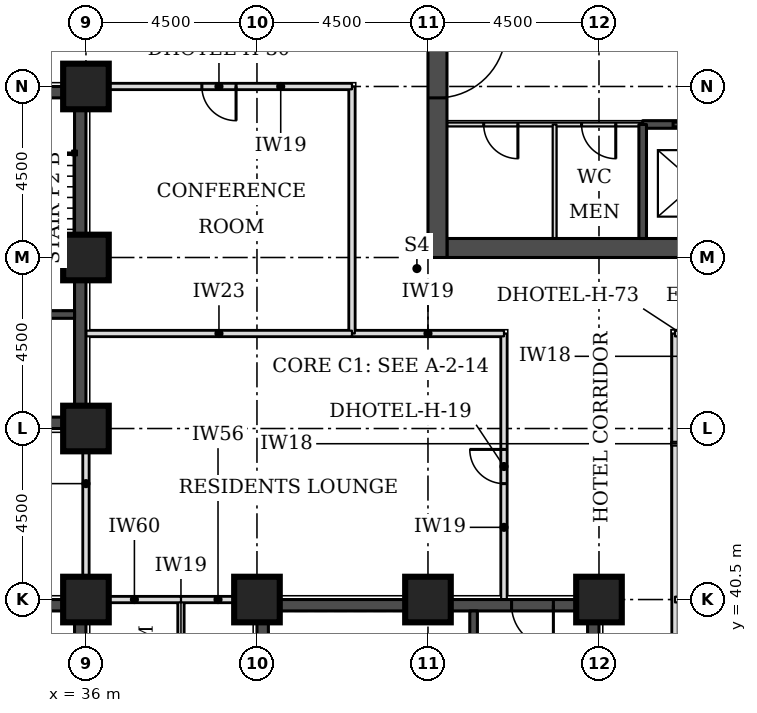
"""IFC4 building model, lengths in metres.
Left out: names, types, materials, properties, quantities, classifications, styles, units other than length and angle.
Written with IfcOpenShell. Run it as: python <this file> out.ifc"""

import sys

from ifc_helpers import new_model, si_unit, direction, frame, frame_2d, origin, origin_2d, place, context, subcontext, project, spatial, rectangle, extrude, element, fill, save


model = new_model("IFC4")
c1 = context("Model", 3, precision=1e-05, world=origin(), true_north=direction((0.0, 1.0)))
c2 = subcontext(c1, "Body", "Model", "MODEL_VIEW")
j1 = project(units=[si_unit("LENGTHUNIT", "METRE"), si_unit("PLANEANGLEUNIT", "RADIAN")], contexts=[c1])
p1 = place(None, origin())
s1 = spatial("IfcSite", under=j1, at=p1, CompositionType="ELEMENT")
p2 = place(p1, origin())
s2 = spatial("IfcBuilding", under=s1, at=p2, CompositionType="ELEMENT")
p3 = place(p2, frame((0.0, 0.0, 46.2)))
s3 = spatial("IfcBuildingStorey", under=s2, at=p3, CompositionType="ELEMENT", Elevation=46.2)
for number, where, z_axis, x_axis in (
    (1, (36.0, 40.5, 0.0), (0.0, 0.0, 1.0), (1.0, 0.0, 0.0)),
    (2, (40.5, 40.5, 0.0), (0.0, 0.0, 1.0), (1.0, 0.0, 0.0)),
    (3, (45.0, 40.5, 0.0), (0.0, 0.0, 1.0), (1.0, 0.0, 0.0)),
    (4, (49.5, 40.5, 0.0), (0.0, 0.0, 1.0), (1.0, 0.0, 0.0)),
    (5, (36.0, 45.0, 0.0), (0.0, 0.0, 1.0), (1.0, 0.0, 0.0)),
    (6, (36.0, 49.5, 0.0), (0.0, 0.0, 1.0), (1.0, 0.0, 0.0)),
    (7, (36.0, 54.0, 0.0), (0.0, 0.0, 1.0), (1.0, 0.0, 0.0)),
):
    element("IfcColumn", number, at=place(p3, frame(where, z_axis=z_axis, x_axis=x_axis)), inside=s3, PredefinedType="COLUMN", context=c2, shape_type="SweptSolid", body=[
        extrude(rectangle(XDim=1.2, YDim=1.2, at=origin_2d()), origin(), (0.0, 0.0, 1.0), 3.3),
    ])
p4 = place(p3, frame((45.5, 49.75, 0.0), z_axis=(0.0, 0.0, 1.0), x_axis=(1.0, 0.0, 0.0)))
e8 = element("IfcWall", 8, at=p4, inside=s3, PredefinedType="SHEAR", context=c2, shape_type="SweptSolid", body=[
    extrude(rectangle(XDim=21.5, YDim=0.5, at=frame_2d((10.75, 0.0))), origin(), (0.0, 0.0, 1.0), 3.3),
])
p5 = place(p3, frame((45.25, 49.5, 0.0), z_axis=(0.0, 0.0, 1.0), x_axis=(0.0, 1.0, 0.0)))
e9 = element("IfcWall", 9, at=p5, inside=s3, PredefinedType="SHEAR", context=c2, shape_type="SweptSolid", body=[
    extrude(rectangle(XDim=22.5, YDim=0.5, at=frame_2d((11.25, 0.0))), origin(), (0.0, 0.0, 1.0), 3.3),
])
p6 = place(p5, frame((4.2, 0.0, 0.0)))
e10 = element("IfcOpeningElement", 10, at=p6, cuts=e9, PredefinedType="OPENING", context=c2, shape_type="SweptSolid", body=[
    extrude(rectangle(XDim=1.8, YDim=2.1, at=frame_2d((0.9, 1.05))), frame((0.0, 0.26, 0.0), z_axis=(0.0, -1.0, 0.0), x_axis=(1.0, 0.0, 0.0)), (0.0, 0.0, 1.0), 0.52),
])
p7 = place(p5, frame((6.9, 0.0, 0.0)))
e11 = element("IfcOpeningElement", 11, at=p7, cuts=e9, PredefinedType="OPENING", context=c2, shape_type="SweptSolid", body=[
    extrude(rectangle(XDim=1.1, YDim=2.1, at=frame_2d((0.55, 1.05))), frame((0.0, 0.26, 0.0), z_axis=(0.0, -1.0, 0.0), x_axis=(1.0, 0.0, 0.0)), (0.0, 0.0, 1.0), 0.52),
])
p8 = place(p5, frame((13.6, 0.0, 0.0)))
e12 = element("IfcOpeningElement", 12, at=p8, cuts=e9, PredefinedType="OPENING", context=c2, shape_type="SweptSolid", body=[
    extrude(rectangle(XDim=1.1, YDim=2.1, at=frame_2d((0.55, 1.05))), frame((0.0, 0.26, 0.0), z_axis=(0.0, -1.0, 0.0), x_axis=(1.0, 0.0, 0.0)), (0.0, 0.0, 1.0), 0.52),
])
p9 = place(p5, frame((16.5, 0.0, 0.0)))
e13 = element("IfcOpeningElement", 13, at=p9, cuts=e9, PredefinedType="OPENING", context=c2, shape_type="SweptSolid", body=[
    extrude(rectangle(XDim=1.8, YDim=2.1, at=frame_2d((0.9, 1.05))), frame((0.0, 0.26, 0.0), z_axis=(0.0, -1.0, 0.0), x_axis=(1.0, 0.0, 0.0)), (0.0, 0.0, 1.0), 0.52),
])
p10 = place(p3, frame((27.3, 45.15, 0.0), z_axis=(0.0, 0.0, 1.0), x_axis=(1.0, 0.0, 0.0)))
e14 = element("IfcWall", 14, at=p10, inside=s3, PredefinedType="SHEAR", context=c2, shape_type="SweptSolid", body=[
    extrude(rectangle(XDim=8.4, YDim=0.3, at=frame_2d((4.2, 0.0))), origin(), (0.0, 0.0, 1.0), 3.3),
])
p11 = place(p10, frame((5.2, 0.0, 0.0)))
e15 = element("IfcOpeningElement", 15, at=p11, cuts=e14, PredefinedType="OPENING", context=c2, shape_type="SweptSolid", body=[
    extrude(rectangle(XDim=1.0, YDim=2.1, at=frame_2d((0.5, 1.05))), frame((0.0, 0.16, 0.0), z_axis=(0.0, -1.0, 0.0), x_axis=(1.0, 0.0, 0.0)), (0.0, 0.0, 1.0), 0.32),
])
p12 = place(p3, frame((27.3, 53.85, 0.0), z_axis=(0.0, 0.0, 1.0), x_axis=(1.0, 0.0, 0.0)))
e16 = element("IfcWall", 16, at=p12, inside=s3, PredefinedType="SHEAR", context=c2, shape_type="SweptSolid", body=[
    extrude(rectangle(XDim=8.4, YDim=0.3, at=frame_2d((4.2, 0.0))), origin(), (0.0, 0.0, 1.0), 3.3),
])
p13 = place(p12, frame((6.4, 0.0, 0.0)))
e17 = element("IfcOpeningElement", 17, at=p13, cuts=e16, PredefinedType="OPENING", context=c2, shape_type="SweptSolid", body=[
    extrude(rectangle(XDim=1.1, YDim=2.1, at=frame_2d((0.55, 1.05))), frame((0.0, 0.16, 0.0), z_axis=(0.0, -1.0, 0.0), x_axis=(1.0, 0.0, 0.0)), (0.0, 0.0, 1.0), 0.32),
])
p14 = place(p3, frame((35.85, 45.0, 0.0), z_axis=(0.0, 0.0, 1.0), x_axis=(0.0, 1.0, 0.0)))
e18 = element("IfcWall", 18, at=p14, inside=s3, PredefinedType="SHEAR", context=c2, shape_type="SweptSolid", body=[
    extrude(rectangle(XDim=9.0, YDim=0.3, at=frame_2d((4.5, 0.0))), origin(), (0.0, 0.0, 1.0), 3.3),
])
p15 = place(p3, frame((40.8, 40.35, 0.0), z_axis=(0.0, 0.0, 1.0), x_axis=(1.0, 0.0, 0.0)))
e19 = element("IfcWall", 19, at=p15, inside=s3, PredefinedType="SHEAR", context=c2, shape_type="SweptSolid", body=[
    extrude(rectangle(XDim=8.4, YDim=0.3, at=frame_2d((4.2, 0.0))), origin(), (0.0, 0.0, 1.0), 3.3),
])
p16 = place(p15, frame((6.4, 0.0, 0.0)))
e20 = element("IfcOpeningElement", 20, at=p16, cuts=e19, PredefinedType="OPENING", context=c2, shape_type="SweptSolid", body=[
    extrude(rectangle(XDim=1.1, YDim=2.1, at=frame_2d((0.55, 1.05))), frame((0.0, 0.16, 0.0), z_axis=(0.0, -1.0, 0.0), x_axis=(1.0, 0.0, 0.0)), (0.0, 0.0, 1.0), 0.32),
])
p17 = place(p3, frame((40.65, 31.5, 0.0), z_axis=(0.0, 0.0, 1.0), x_axis=(0.0, 1.0, 0.0)))
e21 = element("IfcWall", 21, at=p17, inside=s3, PredefinedType="SHEAR", context=c2, shape_type="SweptSolid", body=[
    extrude(rectangle(XDim=9.0, YDim=0.3, at=frame_2d((4.5, 0.0))), origin(), (0.0, 0.0, 1.0), 3.3),
])
p18 = place(p17, frame((0.4, 0.0, 0.0)))
e22 = element("IfcOpeningElement", 22, at=p18, cuts=e21, PredefinedType="OPENING", context=c2, shape_type="SweptSolid", body=[
    extrude(rectangle(XDim=1.1, YDim=2.1, at=frame_2d((0.55, 1.05))), frame((0.0, 0.16, 0.0), z_axis=(0.0, -1.0, 0.0), x_axis=(1.0, 0.0, 0.0)), (0.0, 0.0, 1.0), 0.32),
])
p19 = place(p3, frame((49.35, 31.5, 0.0), z_axis=(0.0, 0.0, 1.0), x_axis=(0.0, 1.0, 0.0)))
e23 = element("IfcWall", 23, at=p19, inside=s3, PredefinedType="SHEAR", context=c2, shape_type="SweptSolid", body=[
    extrude(rectangle(XDim=9.0, YDim=0.3, at=frame_2d((4.5, 0.0))), origin(), (0.0, 0.0, 1.0), 3.3),
])
p20 = place(p3, frame((27.3, 40.35, 0.0), z_axis=(0.0, 0.0, 1.0), x_axis=(1.0, 0.0, 0.0)))
e24 = element("IfcWall", 24, at=p20, inside=s3, PredefinedType="SHEAR", context=c2, shape_type="SweptSolid", body=[
    extrude(rectangle(XDim=8.4, YDim=0.3, at=frame_2d((4.2, 0.0))), origin(), (0.0, 0.0, 1.0), 3.3),
])
p21 = place(p20, frame((6.4, 0.0, 0.0)))
e25 = element("IfcOpeningElement", 25, at=p21, cuts=e24, PredefinedType="OPENING", context=c2, shape_type="SweptSolid", body=[
    extrude(rectangle(XDim=1.1, YDim=2.1, at=frame_2d((0.55, 1.05))), frame((0.0, 0.16, 0.0), z_axis=(0.0, -1.0, 0.0), x_axis=(1.0, 0.0, 0.0)), (0.0, 0.0, 1.0), 0.32),
])
p22 = place(p3, frame((35.85, 31.5, 0.0), z_axis=(0.0, 0.0, 1.0), x_axis=(0.0, 1.0, 0.0)))
e26 = element("IfcWall", 26, at=p22, inside=s3, PredefinedType="SHEAR", context=c2, shape_type="SweptSolid", body=[
    extrude(rectangle(XDim=9.0, YDim=0.3, at=frame_2d((4.5, 0.0))), origin(), (0.0, 0.0, 1.0), 3.3),
])
p23 = place(p3, frame((51.5, 25.15, 0.0), z_axis=(0.0, 0.0, 1.0), x_axis=(0.0, 1.0, 0.0)))
e27 = element("IfcWall", 27, at=p23, inside=s3, PredefinedType="PARTITIONING", context=c2, shape_type="SweptSolid", body=[
    extrude(rectangle(XDim=22.35, YDim=0.15, at=frame_2d((11.175, 0.0))), origin(), (0.0, 0.0, 1.0), 3.08),
])
p24 = place(p23, frame((0.347, 0.0, 0.0)))
e28 = element("IfcOpeningElement", 28, at=p24, cuts=e27, PredefinedType="OPENING", context=c2, shape_type="SweptSolid", body=[
    extrude(rectangle(XDim=1.0, YDim=2.1, at=frame_2d((0.5, 1.05))), frame((0.0, 0.085, 0.0), z_axis=(0.0, -1.0, 0.0), x_axis=(1.0, 0.0, 0.0)), (0.0, 0.0, 1.0), 0.17),
])
p25 = place(p23, frame((7.325, 0.0, 0.0)))
e29 = element("IfcOpeningElement", 29, at=p25, cuts=e27, PredefinedType="OPENING", context=c2, shape_type="SweptSolid", body=[
    extrude(rectangle(XDim=1.0, YDim=2.1, at=frame_2d((0.5, 1.05))), frame((0.0, 0.085, 0.0), z_axis=(0.0, -1.0, 0.0), x_axis=(1.0, 0.0, 0.0)), (0.0, 0.0, 1.0), 0.17),
])
p26 = place(p23, frame((11.675, 0.0, 0.0)))
e30 = element("IfcOpeningElement", 30, at=p26, cuts=e27, PredefinedType="OPENING", context=c2, shape_type="SweptSolid", body=[
    extrude(rectangle(XDim=1.0, YDim=2.1, at=frame_2d((0.5, 1.05))), frame((0.0, 0.085, 0.0), z_axis=(0.0, -1.0, 0.0), x_axis=(1.0, 0.0, 0.0)), (0.0, 0.0, 1.0), 0.17),
])
p27 = place(p3, frame((38.5, 27.15, 0.0), z_axis=(0.0, 0.0, 1.0), x_axis=(0.0, 1.0, 0.0)))
e31 = element("IfcWall", 31, at=p27, inside=s3, PredefinedType="PARTITIONING", context=c2, shape_type="SweptSolid", body=[
    extrude(rectangle(XDim=13.35, YDim=0.15, at=frame_2d((6.675, 0.0))), origin(), (0.0, 0.0, 1.0), 3.08),
])
p28 = place(p27, frame((6.225, 0.0, 0.0)))
e32 = element("IfcOpeningElement", 32, at=p28, cuts=e31, PredefinedType="OPENING", context=c2, shape_type="SweptSolid", body=[
    extrude(rectangle(XDim=0.9, YDim=2.1, at=frame_2d((0.45, 1.05))), frame((0.0, 0.085, 0.0), z_axis=(0.0, -1.0, 0.0), x_axis=(1.0, 0.0, 0.0)), (0.0, 0.0, 1.0), 0.17),
])
p29 = place(p3, frame((38.5, 40.5, 0.0), z_axis=(0.0, 0.0, 1.0), x_axis=(1.0, 0.0, 0.0)))
e33 = element("IfcWall", 33, at=p29, inside=s3, PredefinedType="PARTITIONING", context=c2, shape_type="SweptSolid", body=[
    extrude(rectangle(XDim=1.95, YDim=0.15, at=frame_2d((0.975, 0.0))), origin(), (0.0, 0.0, 1.0), 2.33),
])
p30 = place(p3, frame((36.0, 40.55, 0.0), z_axis=(0.0, 0.0, 1.0), x_axis=(0.0, 1.0, 0.0)))
e34 = element("IfcWall", 34, at=p30, inside=s3, PredefinedType="PARTITIONING", context=c2, shape_type="SweptSolid", body=[
    extrude(rectangle(XDim=4.4, YDim=0.15, at=frame_2d((2.2, 0.0))), origin(), (0.0, 0.0, 1.0), 2.33),
])
p31 = place(p3, frame((47.0, 40.5, 0.0), z_axis=(0.0, 0.0, 1.0), x_axis=(0.0, 1.0, 0.0)))
e35 = element("IfcWall", 35, at=p31, inside=s3, PredefinedType="PARTITIONING", context=c2, shape_type="SweptSolid", body=[
    extrude(rectangle(XDim=7.0, YDim=0.15, at=frame_2d((3.5, 0.0))), origin(), (0.0, 0.0, 1.0), 3.08),
])
p32 = place(p31, frame((3.05, 0.0, 0.0)))
e36 = element("IfcOpeningElement", 36, at=p32, cuts=e35, PredefinedType="OPENING", context=c2, shape_type="SweptSolid", body=[
    extrude(rectangle(XDim=0.9, YDim=2.1, at=frame_2d((0.45, 1.05))), frame((0.0, 0.085, 0.0), z_axis=(0.0, -1.0, 0.0), x_axis=(1.0, 0.0, 0.0)), (0.0, 0.0, 1.0), 0.17),
])
p33 = place(p3, frame((43.0, 47.5, 0.0), z_axis=(0.0, 0.0, 1.0), x_axis=(1.0, 0.0, 0.0)))
e37 = element("IfcWall", 37, at=p33, inside=s3, PredefinedType="PARTITIONING", context=c2, shape_type="SweptSolid", body=[
    extrude(rectangle(XDim=4.0, YDim=0.15, at=frame_2d((2.0, 0.0))), origin(), (0.0, 0.0, 1.0), 3.08),
])
p34 = place(p3, frame((43.0, 47.5, 0.0), z_axis=(0.0, 0.0, 1.0), x_axis=(0.0, 1.0, 0.0)))
e38 = element("IfcWall", 38, at=p34, inside=s3, PredefinedType="PARTITIONING", context=c2, shape_type="SweptSolid", body=[
    extrude(rectangle(XDim=6.5, YDim=0.15, at=frame_2d((3.25, 0.0))), origin(), (0.0, 0.0, 1.0), 3.08),
])
p35 = place(p3, frame((51.5, 47.5, 0.0), z_axis=(0.0, 0.0, 1.0), x_axis=(1.0, 0.0, 0.0)))
e39 = element("IfcWall", 39, at=p35, inside=s3, PredefinedType="PARTITIONING", context=c2, shape_type="SweptSolid", body=[
    extrude(rectangle(XDim=18.0, YDim=0.15, at=frame_2d((9.0, 0.0))), origin(), (0.0, 0.0, 1.0), 3.08),
])
p36 = place(p35, frame((12.65, 0.0, 0.0)))
e40 = element("IfcOpeningElement", 40, at=p36, cuts=e39, PredefinedType="OPENING", context=c2, shape_type="SweptSolid", body=[
    extrude(rectangle(XDim=1.1, YDim=2.1, at=frame_2d((0.55, 1.05))), frame((0.0, 0.085, 0.0), z_axis=(0.0, -1.0, 0.0), x_axis=(1.0, 0.0, 0.0)), (0.0, 0.0, 1.0), 0.17),
])
p37 = place(p35, frame((16.5, 0.0, 0.0)))
e41 = element("IfcOpeningElement", 41, at=p37, cuts=e39, PredefinedType="OPENING", context=c2, shape_type="SweptSolid", body=[
    extrude(rectangle(XDim=1.0, YDim=2.1, at=frame_2d((0.5, 1.05))), frame((0.0, 0.085, 0.0), z_axis=(0.0, -1.0, 0.0), x_axis=(1.0, 0.0, 0.0)), (0.0, 0.0, 1.0), 0.17),
])
p38 = place(p35, frame((4.21, 0.0, 0.0)))
e42 = element("IfcOpeningElement", 42, at=p38, cuts=e39, PredefinedType="OPENING", context=c2, shape_type="SweptSolid", body=[
    extrude(rectangle(XDim=1.0, YDim=2.1, at=frame_2d((0.5, 1.05))), frame((0.0, 0.085, 0.0), z_axis=(0.0, -1.0, 0.0), x_axis=(1.0, 0.0, 0.0)), (0.0, 0.0, 1.0), 0.17),
])
p39 = place(p3, frame((36.05, 54.0, 0.0), z_axis=(0.0, 0.0, 1.0), x_axis=(1.0, 0.0, 0.0)))
e43 = element("IfcWall", 43, at=p39, inside=s3, PredefinedType="PARTITIONING", context=c2, shape_type="SweptSolid", body=[
    extrude(rectangle(XDim=6.95, YDim=0.15, at=frame_2d((3.475, 0.0))), origin(), (0.0, 0.0, 1.0), 3.08),
])
p40 = place(p39, frame((3.0, 0.0, 0.0)))
e44 = element("IfcOpeningElement", 44, at=p40, cuts=e43, PredefinedType="OPENING", context=c2, shape_type="SweptSolid", body=[
    extrude(rectangle(XDim=0.9, YDim=2.1, at=frame_2d((0.45, 1.05))), frame((0.0, 0.085, 0.0), z_axis=(0.0, -1.0, 0.0), x_axis=(1.0, 0.0, 0.0)), (0.0, 0.0, 1.0), 0.17),
])
p41 = place(p3, frame((36.05, 40.5, 0.0), z_axis=(0.0, 0.0, 1.0), x_axis=(1.0, 0.0, 0.0)))
e45 = element("IfcWall", 45, at=p41, inside=s3, PredefinedType="PARTITIONING", context=c2, shape_type="SweptSolid", body=[
    extrude(rectangle(XDim=2.45, YDim=0.15, at=frame_2d((1.225, 0.0))), origin(), (0.0, 0.0, 1.0), 2.33),
])
p42 = place(p3, frame((51.5, 40.5, 0.0), z_axis=(0.0, 0.0, 1.0), x_axis=(1.0, 0.0, 0.0)))
e46 = element("IfcWall", 46, at=p42, inside=s3, PredefinedType="PARTITIONING", context=c2, shape_type="SweptSolid", body=[
    extrude(rectangle(XDim=6.4, YDim=0.15, at=frame_2d((3.2, 0.0))), origin(), (0.0, 0.0, 1.0), 2.33),
])
p43 = place(p3, frame((36.0, 47.5, 0.0), z_axis=(0.0, 0.0, 1.0), x_axis=(1.0, 0.0, 0.0)))
e47 = element("IfcWall", 47, at=p43, inside=s3, PredefinedType="PARTITIONING", context=c2, shape_type="SweptSolid", body=[
    extrude(rectangle(XDim=7.0, YDim=0.15, at=frame_2d((3.5, 0.0))), origin(), (0.0, 0.0, 1.0), 3.08),
])
p44 = place(p3, frame((53.8, 44.6, 0.0), z_axis=(0.0, 0.0, 1.0), x_axis=(-1.0, 0.0, 0.0)))
e48 = element("IfcWall", 48, at=p44, inside=s3, PredefinedType="PARTITIONING", context=c2, shape_type="SweptSolid", body=[
    extrude(rectangle(XDim=2.4, YDim=0.1, at=frame_2d((1.2, 0.0))), origin(), (0.0, 0.0, 1.0), 3.08),
])
p45 = place(p3, frame((45.5, 53.0, 0.0), z_axis=(0.0, 0.0, 1.0), x_axis=(1.0, 0.0, 0.0)))
e49 = element("IfcWall", 49, at=p45, inside=s3, PredefinedType="PARTITIONING", context=c2, shape_type="SweptSolid", body=[
    extrude(rectangle(XDim=5.15, YDim=0.1, at=frame_2d((2.575, 0.0))), origin(), (0.0, 0.0, 1.0), 3.08),
])
p46 = place(p45, frame((0.966, 0.0, 0.0)))
e50 = element("IfcOpeningElement", 50, at=p46, cuts=e49, PredefinedType="OPENING", context=c2, shape_type="SweptSolid", body=[
    extrude(rectangle(XDim=0.9, YDim=2.1, at=frame_2d((0.45, 1.05))), frame((0.0, 0.06, 0.0), z_axis=(0.0, -1.0, 0.0), x_axis=(1.0, 0.0, 0.0)), (0.0, 0.0, 1.0), 0.12),
])
p47 = place(p45, frame((3.541, 0.0, 0.0)))
e51 = element("IfcOpeningElement", 51, at=p47, cuts=e49, PredefinedType="OPENING", context=c2, shape_type="SweptSolid", body=[
    extrude(rectangle(XDim=0.9, YDim=2.1, at=frame_2d((0.45, 1.05))), frame((0.0, 0.06, 0.0), z_axis=(0.0, -1.0, 0.0), x_axis=(1.0, 0.0, 0.0)), (0.0, 0.0, 1.0), 0.12),
])
p48 = place(p3, frame((50.65, 53.0, 0.0), z_axis=(0.0, 0.0, 1.0), x_axis=(1.0, 0.0, 0.0)))
e52 = element("IfcWall", 52, at=p48, inside=s3, PredefinedType="SOLIDWALL", context=c2, shape_type="SweptSolid", body=[
    extrude(rectangle(XDim=11.2, YDim=0.2, at=frame_2d((5.6, 0.0))), origin(), (0.0, 0.0, 1.0), 3.08),
])
p49 = place(p48, frame((0.8, 0.0, 0.0)))
e53 = element("IfcOpeningElement", 53, at=p49, cuts=e52, PredefinedType="OPENING", context=c2, shape_type="SweptSolid", body=[
    extrude(rectangle(XDim=1.2, YDim=2.1, at=frame_2d((0.6, 1.05))), frame((0.0, 0.11, 0.0), z_axis=(0.0, -1.0, 0.0), x_axis=(1.0, 0.0, 0.0)), (0.0, 0.0, 1.0), 0.22),
])
p50 = place(p48, frame((3.6, 0.0, 0.0)))
e54 = element("IfcOpeningElement", 54, at=p50, cuts=e52, PredefinedType="OPENING", context=c2, shape_type="SweptSolid", body=[
    extrude(rectangle(XDim=1.2, YDim=2.1, at=frame_2d((0.6, 1.05))), frame((0.0, 0.11, 0.0), z_axis=(0.0, -1.0, 0.0), x_axis=(1.0, 0.0, 0.0)), (0.0, 0.0, 1.0), 0.22),
])
p51 = place(p48, frame((6.4, 0.0, 0.0)))
e55 = element("IfcOpeningElement", 55, at=p51, cuts=e52, PredefinedType="OPENING", context=c2, shape_type="SweptSolid", body=[
    extrude(rectangle(XDim=1.2, YDim=2.1, at=frame_2d((0.6, 1.05))), frame((0.0, 0.11, 0.0), z_axis=(0.0, -1.0, 0.0), x_axis=(1.0, 0.0, 0.0)), (0.0, 0.0, 1.0), 0.22),
])
p52 = place(p48, frame((9.2, 0.0, 0.0)))
e56 = element("IfcOpeningElement", 56, at=p52, cuts=e52, PredefinedType="OPENING", context=c2, shape_type="SweptSolid", body=[
    extrude(rectangle(XDim=1.2, YDim=2.1, at=frame_2d((0.6, 1.05))), frame((0.0, 0.11, 0.0), z_axis=(0.0, -1.0, 0.0), x_axis=(1.0, 0.0, 0.0)), (0.0, 0.0, 1.0), 0.22),
])
p53 = place(p3, frame((48.333, 50.0, 0.0), z_axis=(0.0, 0.0, 1.0), x_axis=(0.0, 1.0, 0.0)))
e57 = element("IfcWall", 57, at=p53, inside=s3, PredefinedType="PARTITIONING", context=c2, shape_type="SweptSolid", body=[
    extrude(rectangle(XDim=3.0, YDim=0.1, at=frame_2d((1.5, 0.0))), origin(), (0.0, 0.0, 1.0), 3.08),
])
for number, where, z_axis, x_axis in (
    (58, (50.65, 50.0, 0.0), (0.0, 0.0, 1.0), (0.0, 1.0, 0.0)),
    (59, (32.7, 48.0, 0.0), (0.0, 0.0, 1.0), (1.0, 0.0, 0.0)),
):
    element("IfcWall", number, at=place(p3, frame(where, z_axis=z_axis, x_axis=x_axis)), inside=s3, PredefinedType="SOLIDWALL", context=c2, shape_type="SweptSolid", body=[
        extrude(rectangle(XDim=3.0, YDim=0.2, at=frame_2d((1.5, 0.0))), origin(), (0.0, 0.0, 1.0), 3.08),
    ])
p54 = place(p3, frame((46.2, 34.5, 0.0), z_axis=(0.0, 0.0, 1.0), x_axis=(0.0, 1.0, 0.0)))
e60 = element("IfcWall", 60, at=p54, inside=s3, PredefinedType="SOLIDWALL", context=c2, shape_type="SweptSolid", body=[
    extrude(rectangle(XDim=5.7, YDim=0.2, at=frame_2d((2.85, 0.0))), origin(), (0.0, 0.0, 1.0), 3.08),
])
p55 = place(p40, frame((0.9, 0.0, 0.0), z_axis=(0.0, 0.0, 1.0), x_axis=(-1.0, 0.0, 0.0)))
e61 = element("IfcDoor", 61, at=p55, inside=s3, OperationType="SINGLE_SWING_LEFT", PredefinedType="DOOR", context=c2, shape_type="SweptSolid", body=[
    extrude(rectangle(XDim=0.9, YDim=2.1, at=frame_2d((0.45, 1.05))), frame((0.0, 0.025, 0.0), z_axis=(0.0, -1.0, 0.0), x_axis=(1.0, 0.0, 0.0)), (0.0, 0.0, 1.0), 0.05),
])
fill(e44, e61)
p56 = place(p32, origin())
e62 = element("IfcDoor", 62, at=p56, inside=s3, OperationType="SINGLE_SWING_RIGHT", PredefinedType="DOOR", context=c2, shape_type="SweptSolid", body=[
    extrude(rectangle(XDim=0.9, YDim=2.1, at=frame_2d((0.45, 1.05))), frame((0.0, 0.025, 0.0), z_axis=(0.0, -1.0, 0.0), x_axis=(1.0, 0.0, 0.0)), (0.0, 0.0, 1.0), 0.05),
])
fill(e36, e62)
p57 = place(p49, origin())
e63 = element("IfcDoor", 63, at=p57, inside=s3, OperationType="DOUBLE_DOOR_SLIDING", PredefinedType="DOOR", context=c2, shape_type="SweptSolid", body=[
    extrude(rectangle(XDim=1.2, YDim=2.1, at=frame_2d((0.6, 1.05))), frame((0.0, 0.025, 0.0), z_axis=(0.0, -1.0, 0.0), x_axis=(1.0, 0.0, 0.0)), (0.0, 0.0, 1.0), 0.05),
])
fill(e53, e63)
p58 = place(p6, frame((1.8, 0.0, 0.0), z_axis=(0.0, 0.0, 1.0), x_axis=(-1.0, 0.0, 0.0)))
e64 = element("IfcDoor", 64, at=p58, inside=s3, OperationType="SINGLE_SWING_LEFT", PredefinedType="DOOR", context=c2, shape_type="SweptSolid", body=[
    extrude(rectangle(XDim=1.8, YDim=2.1, at=frame_2d((0.9, 1.05))), frame((0.0, 0.025, 0.0), z_axis=(0.0, -1.0, 0.0), x_axis=(1.0, 0.0, 0.0)), (0.0, 0.0, 1.0), 0.05),
])
fill(e10, e64)
p59 = place(p46, frame((0.9, 0.0, 0.0), z_axis=(0.0, 0.0, 1.0), x_axis=(-1.0, 0.0, 0.0)))
e65 = element("IfcDoor", 65, at=p59, inside=s3, OperationType="SINGLE_SWING_LEFT", PredefinedType="DOOR", context=c2, shape_type="SweptSolid", body=[
    extrude(rectangle(XDim=0.9, YDim=2.1, at=frame_2d((0.45, 1.05))), frame((0.0, 0.025, 0.0), z_axis=(0.0, -1.0, 0.0), x_axis=(1.0, 0.0, 0.0)), (0.0, 0.0, 1.0), 0.05),
])
fill(e50, e65)
p60 = place(p47, frame((0.9, 0.0, 0.0), z_axis=(0.0, 0.0, 1.0), x_axis=(-1.0, 0.0, 0.0)))
e66 = element("IfcDoor", 66, at=p60, inside=s3, OperationType="SINGLE_SWING_LEFT", PredefinedType="DOOR", context=c2, shape_type="SweptSolid", body=[
    extrude(rectangle(XDim=0.9, YDim=2.1, at=frame_2d((0.45, 1.05))), frame((0.0, 0.025, 0.0), z_axis=(0.0, -1.0, 0.0), x_axis=(1.0, 0.0, 0.0)), (0.0, 0.0, 1.0), 0.05),
])
fill(e51, e66)
p61 = place(p16, frame((1.1, 0.0, 0.0), z_axis=(0.0, 0.0, 1.0), x_axis=(-1.0, 0.0, 0.0)))
e67 = element("IfcDoor", 67, at=p61, inside=s3, OperationType="SINGLE_SWING_LEFT", PredefinedType="DOOR", context=c2, shape_type="SweptSolid", body=[
    extrude(rectangle(XDim=1.1, YDim=2.1, at=frame_2d((0.55, 1.05))), frame((0.0, 0.025, 0.0), z_axis=(0.0, -1.0, 0.0), x_axis=(1.0, 0.0, 0.0)), (0.0, 0.0, 1.0), 0.05),
])
fill(e20, e67)
save(model, sys.argv[1])
